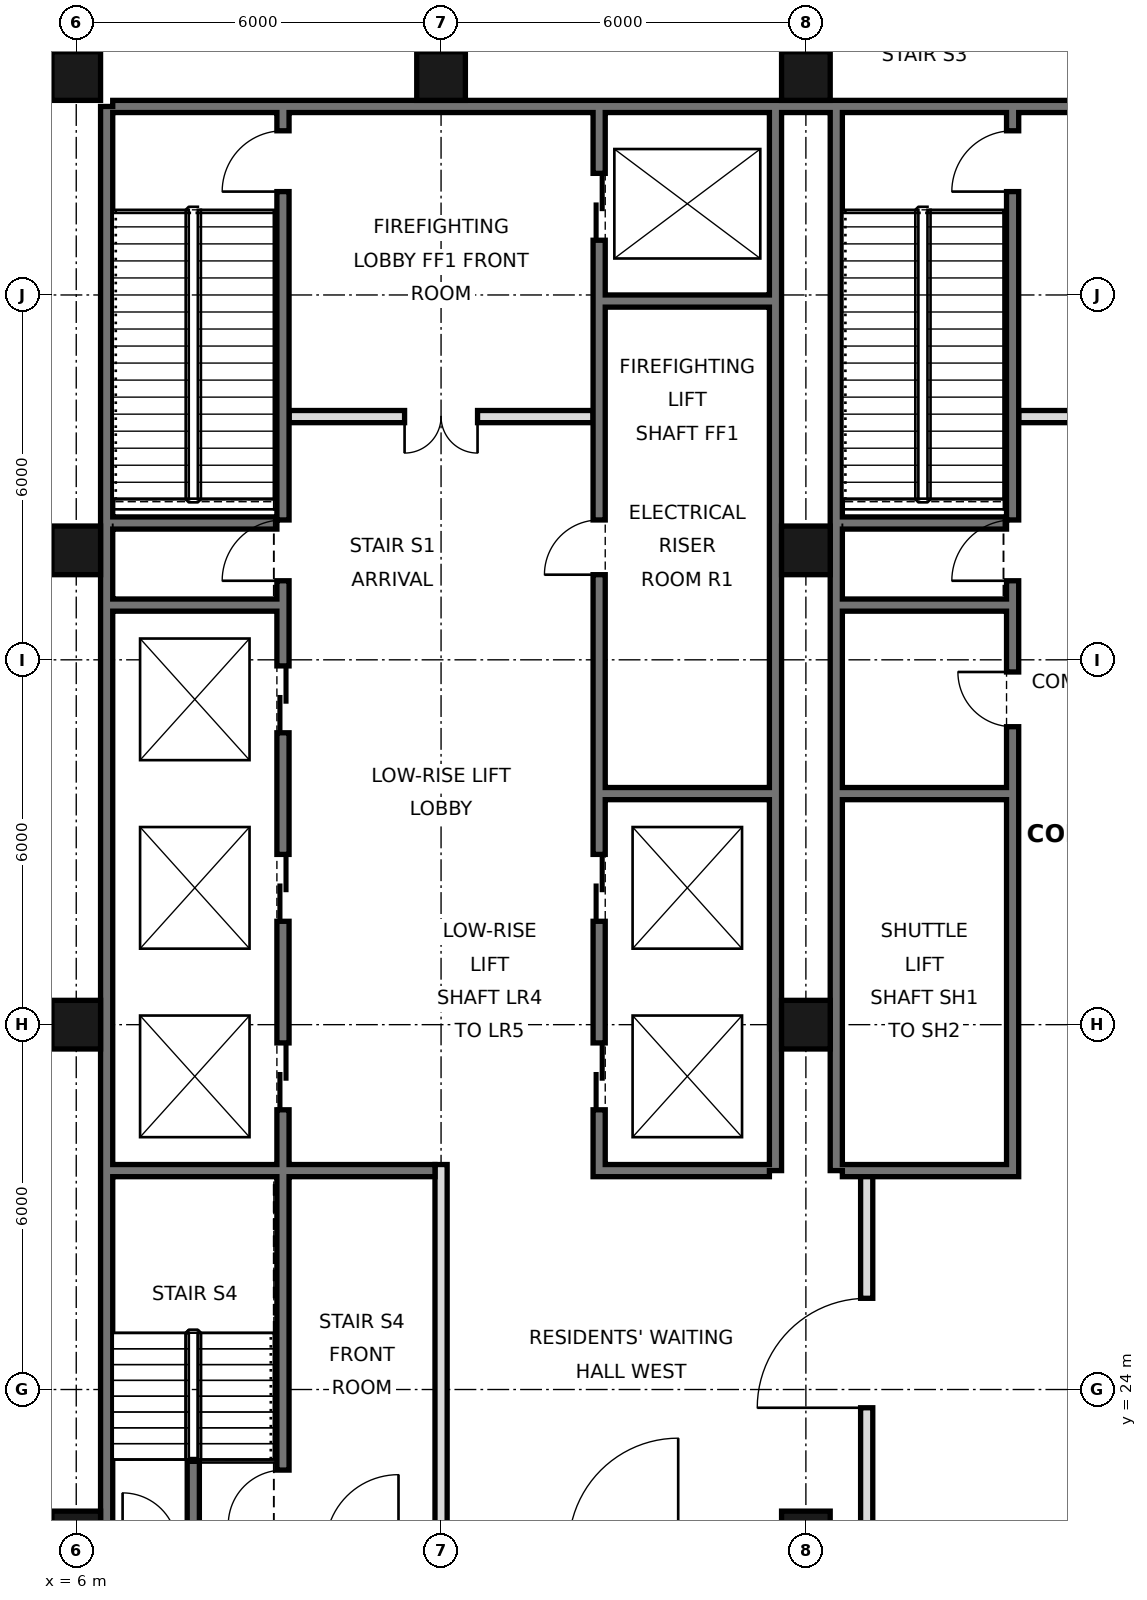
"""IFC4 building model, lengths in metres.
Left out: names, types, materials, properties, quantities, classifications, styles, units other than length and angle.
Written with IfcOpenShell. Run it as: python <this file> out.ifc"""

import sys

from ifc_helpers import new_model, si_unit, direction, frame, frame_2d, origin, origin_2d, place, context, subcontext, project, spatial, rectangle, hollow_rectangle, extrude, element, fill, save


model = new_model("IFC4")
c1 = context("Model", 3, precision=1e-05, world=origin(), true_north=direction((0.0, 1.0)))
c2 = subcontext(c1, "Body", "Model", "MODEL_VIEW")
j1 = project(units=[si_unit("LENGTHUNIT", "METRE"), si_unit("PLANEANGLEUNIT", "RADIAN")], contexts=[c1])
p1 = place(None, origin())
s1 = spatial("IfcSite", under=j1, at=p1, CompositionType="ELEMENT")
p2 = place(p1, origin())
s2 = spatial("IfcBuilding", under=s1, at=p2, CompositionType="ELEMENT")
p3 = place(p2, frame((0.0, 0.0, 90.2)))
s3 = spatial("IfcBuildingStorey", under=s2, at=p3, CompositionType="ELEMENT", Elevation=90.2)
for number, where, z_axis, x_axis in (
    (1, (6.0, 21.6, 0.0), (0.0, 0.0, 1.0), (1.0, 0.0, 0.0)),
    (2, (6.0, 30.0, 0.0), (0.0, 0.0, 1.0), (1.0, 0.0, 0.0)),
    (3, (6.0, 37.8, 0.0), (0.0, 0.0, 1.0), (1.0, 0.0, 0.0)),
    (4, (6.0, 45.6, 0.0), (0.0, 0.0, 1.0), (1.0, 0.0, 0.0)),
    (5, (12.0, 45.6, 0.0), (0.0, 0.0, 1.0), (1.0, 0.0, 0.0)),
    (6, (18.0, 21.6, 0.0), (0.0, 0.0, 1.0), (1.0, 0.0, 0.0)),
    (7, (18.0, 30.0, 0.0), (0.0, 0.0, 1.0), (1.0, 0.0, 0.0)),
    (8, (18.0, 37.8, 0.0), (0.0, 0.0, 1.0), (1.0, 0.0, 0.0)),
    (9, (18.0, 45.6, 0.0), (0.0, 0.0, 1.0), (1.0, 0.0, 0.0)),
):
    element("IfcColumn", number, at=place(p3, frame(where, z_axis=z_axis, x_axis=x_axis)), inside=s3, PredefinedType="COLUMN", context=c2, shape_type="SweptSolid", body=[
        extrude(hollow_rectangle(XDim=0.8, YDim=0.8, WallThickness=0.06, at=origin_2d()), origin(), (0.0, 0.0, 1.0), 6.0),
    ])
p4 = place(p3, frame((5.805, 48.47, 0.0), z_axis=(0.0, 0.0, 1.0), x_axis=(-0.707106781187, -0.707106781187, 0.0)))
e10 = element("IfcWall", 10, at=p4, inside=s3, PredefinedType="SOLIDWALL", context=c2, shape_type="SweptSolid", body=[
    extrude(rectangle(XDim=8.875, YDim=0.3, at=frame_2d((4.438, 0.0))), origin(), (0.0, 0.0, 1.0), 5.7),
])
p5 = place(p3, frame((6.5, 21.6, 0.0), z_axis=(0.0, 0.0, 1.0), x_axis=(0.0, 1.0, 0.0)))
e11 = element("IfcWall", 11, at=p5, inside=s3, PredefinedType="SOLIDWALL", context=c2, shape_type="SweptSolid", body=[
    extrude(rectangle(XDim=23.5, YDim=0.2, at=frame_2d((11.75, 0.0))), origin(), (0.0, 0.0, 1.0), 5.7),
])
p6 = place(p3, frame((6.6, 45.1, 0.0), z_axis=(0.0, 0.0, 1.0), x_axis=(1.0, 0.0, 0.0)))
e12 = element("IfcWall", 12, at=p6, inside=s3, PredefinedType="SOLIDWALL", context=c2, shape_type="SweptSolid", body=[
    extrude(rectangle(XDim=34.8, YDim=0.2, at=frame_2d((17.4, 0.0))), origin(), (0.0, 0.0, 1.0), 5.7),
])
for number, where, z_axis, x_axis in (
    (13, (17.5, 27.6, 0.0), (0.0, 0.0, 1.0), (0.0, 1.0, 0.0)),
    (14, (18.5, 27.6, 0.0), (0.0, 0.0, 1.0), (0.0, 1.0, 0.0)),
):
    element("IfcWall", number, at=place(p3, frame(where, z_axis=z_axis, x_axis=x_axis)), inside=s3, PredefinedType="SOLIDWALL", context=c2, shape_type="SweptSolid", body=[
        extrude(rectangle(XDim=17.5, YDim=0.2, at=frame_2d((8.75, 0.0))), origin(), (0.0, 0.0, 1.0), 5.7),
    ])
p7 = place(p3, frame((19.0, 21.6, 0.0), z_axis=(0.0, 0.0, 1.0), x_axis=(0.0, 1.0, 0.0)))
e15 = element("IfcWall", 15, at=p7, inside=s3, PredefinedType="PARTITIONING", context=c2, shape_type="SweptSolid", body=[
    extrude(rectangle(XDim=6.0, YDim=0.2, at=frame_2d((3.0, 0.0))), origin(), (0.0, 0.0, 1.0), 5.7),
])
p8 = place(p7, frame((2.1, 0.0, 0.0)))
e16 = element("IfcOpeningElement", 16, at=p8, cuts=e15, PredefinedType="OPENING", context=c2, shape_type="SweptSolid", body=[
    extrude(rectangle(XDim=1.8, YDim=2.1, at=frame_2d((0.9, 1.05))), frame((0.0, 0.11, 0.0), z_axis=(0.0, -1.0, 0.0), x_axis=(1.0, 0.0, 0.0)), (0.0, 0.0, 1.0), 0.22),
])
p9 = place(p3, frame((12.0, 21.6, 0.0), z_axis=(0.0, 0.0, 1.0), x_axis=(0.0, 1.0, 0.0)))
e17 = element("IfcWall", 17, at=p9, inside=s3, PredefinedType="PARTITIONING", context=c2, shape_type="SweptSolid", body=[
    extrude(rectangle(XDim=6.1, YDim=0.2, at=frame_2d((3.05, 0.0))), origin(), (0.0, 0.0, 1.0), 5.7),
])
p10 = place(p3, frame((14.6, 27.5, 0.0), z_axis=(0.0, 0.0, 1.0), x_axis=(0.0, 1.0, 0.0)))
e18 = element("IfcWall", 18, at=p10, inside=s3, PredefinedType="SOLIDWALL", context=c2, shape_type="SweptSolid", body=[
    extrude(rectangle(XDim=17.5, YDim=0.2, at=frame_2d((8.75, 0.0))), origin(), (0.0, 0.0, 1.0), 5.7),
])
p11 = place(p10, frame((1.1, 0.0, 0.0)))
e19 = element("IfcOpeningElement", 19, at=p11, cuts=e18, PredefinedType="OPENING", context=c2, shape_type="SweptSolid", body=[
    extrude(rectangle(XDim=1.1, YDim=2.1, at=frame_2d((0.55, 1.05))), frame((0.0, 0.11, 0.0), z_axis=(0.0, -1.0, 0.0), x_axis=(1.0, 0.0, 0.0)), (0.0, 0.0, 1.0), 0.22),
])
p12 = place(p10, frame((4.2, 0.0, 0.0)))
e20 = element("IfcOpeningElement", 20, at=p12, cuts=e18, PredefinedType="OPENING", context=c2, shape_type="SweptSolid", body=[
    extrude(rectangle(XDim=1.1, YDim=2.1, at=frame_2d((0.55, 1.05))), frame((0.0, 0.11, 0.0), z_axis=(0.0, -1.0, 0.0), x_axis=(1.0, 0.0, 0.0)), (0.0, 0.0, 1.0), 0.22),
])
p13 = place(p10, frame((15.4, 0.0, 0.0)))
e21 = element("IfcOpeningElement", 21, at=p13, cuts=e18, PredefinedType="OPENING", context=c2, shape_type="SweptSolid", body=[
    extrude(rectangle(XDim=1.1, YDim=2.1, at=frame_2d((0.55, 1.05))), frame((0.0, 0.11, 0.0), z_axis=(0.0, -1.0, 0.0), x_axis=(1.0, 0.0, 0.0)), (0.0, 0.0, 1.0), 0.22),
])
p14 = place(p10, frame((9.9, 0.0, 0.0)))
e22 = element("IfcOpeningElement", 22, at=p14, cuts=e18, PredefinedType="OPENING", context=c2, shape_type="SweptSolid", body=[
    extrude(rectangle(XDim=0.9, YDim=2.1, at=frame_2d((0.45, 1.05))), frame((0.0, 0.11, 0.0), z_axis=(0.0, -1.0, 0.0), x_axis=(1.0, 0.0, 0.0)), (0.0, 0.0, 1.0), 0.22),
])
p15 = place(p3, frame((21.4, 27.5, 0.0), z_axis=(0.0, 0.0, 1.0), x_axis=(0.0, 1.0, 0.0)))
e23 = element("IfcWall", 23, at=p15, inside=s3, PredefinedType="SOLIDWALL", context=c2, shape_type="SweptSolid", body=[
    extrude(rectangle(XDim=17.5, YDim=0.2, at=frame_2d((8.75, 0.0))), origin(), (0.0, 0.0, 1.0), 5.7),
])
p16 = place(p15, frame((9.8, 0.0, 0.0)))
e24 = element("IfcOpeningElement", 24, at=p16, cuts=e23, PredefinedType="OPENING", context=c2, shape_type="SweptSolid", body=[
    extrude(rectangle(XDim=1.0, YDim=2.1, at=frame_2d((0.5, 1.05))), frame((0.0, 0.11, 0.0), z_axis=(0.0, -1.0, 0.0), x_axis=(1.0, 0.0, 0.0)), (0.0, 0.0, 1.0), 0.22),
])
p17 = place(p15, frame((16.2, 0.0, 0.0)))
e25 = element("IfcOpeningElement", 25, at=p17, cuts=e23, PredefinedType="OPENING", context=c2, shape_type="SweptSolid", body=[
    extrude(rectangle(XDim=1.0, YDim=2.1, at=frame_2d((0.5, 1.05))), frame((0.0, 0.11, 0.0), z_axis=(0.0, -1.0, 0.0), x_axis=(1.0, 0.0, 0.0)), (0.0, 0.0, 1.0), 0.22),
])
p18 = place(p15, frame((7.4, 0.0, 0.0)))
e26 = element("IfcOpeningElement", 26, at=p18, cuts=e23, PredefinedType="OPENING", context=c2, shape_type="SweptSolid", body=[
    extrude(rectangle(XDim=0.9, YDim=2.1, at=frame_2d((0.45, 1.05))), frame((0.0, 0.11, 0.0), z_axis=(0.0, -1.0, 0.0), x_axis=(1.0, 0.0, 0.0)), (0.0, 0.0, 1.0), 0.22),
])
p19 = place(p3, frame((7.925, 21.6, 0.0), z_axis=(0.0, 0.0, 1.0), x_axis=(0.0, 1.0, 0.0)))
e27 = element("IfcWall", 27, at=p19, inside=s3, PredefinedType="SOLIDWALL", context=c2, shape_type="SweptSolid", body=[
    extrude(rectangle(XDim=1.25, YDim=0.2, at=frame_2d((0.625, 0.0))), origin(), (0.0, 0.0, 1.0), 5.7),
])
p20 = place(p3, frame((9.4, 21.6, 0.0), z_axis=(0.0, 0.0, 1.0), x_axis=(0.0, 1.0, 0.0)))
e28 = element("IfcWall", 28, at=p20, inside=s3, PredefinedType="SOLIDWALL", context=c2, shape_type="SweptSolid", body=[
    extrude(rectangle(XDim=23.4, YDim=0.2, at=frame_2d((11.7, 0.0))), origin(), (0.0, 0.0, 1.0), 5.7),
])
p21 = place(p20, frame((7.0, 0.0, 0.0)))
e29 = element("IfcOpeningElement", 29, at=p21, cuts=e28, PredefinedType="OPENING", context=c2, shape_type="SweptSolid", body=[
    extrude(rectangle(XDim=1.1, YDim=2.1, at=frame_2d((0.55, 1.05))), frame((0.0, 0.11, 0.0), z_axis=(0.0, -1.0, 0.0), x_axis=(1.0, 0.0, 0.0)), (0.0, 0.0, 1.0), 0.22),
])
p22 = place(p20, frame((10.1, 0.0, 0.0)))
e30 = element("IfcOpeningElement", 30, at=p22, cuts=e28, PredefinedType="OPENING", context=c2, shape_type="SweptSolid", body=[
    extrude(rectangle(XDim=1.1, YDim=2.1, at=frame_2d((0.55, 1.05))), frame((0.0, 0.11, 0.0), z_axis=(0.0, -1.0, 0.0), x_axis=(1.0, 0.0, 0.0)), (0.0, 0.0, 1.0), 0.22),
])
p23 = place(p20, frame((13.2, 0.0, 0.0)))
e31 = element("IfcOpeningElement", 31, at=p23, cuts=e28, PredefinedType="OPENING", context=c2, shape_type="SweptSolid", body=[
    extrude(rectangle(XDim=1.1, YDim=2.1, at=frame_2d((0.55, 1.05))), frame((0.0, 0.11, 0.0), z_axis=(0.0, -1.0, 0.0), x_axis=(1.0, 0.0, 0.0)), (0.0, 0.0, 1.0), 0.22),
])
p24 = place(p20, frame((15.7, 0.0, 0.0)))
e32 = element("IfcOpeningElement", 32, at=p24, cuts=e28, PredefinedType="OPENING", context=c2, shape_type="SweptSolid", body=[
    extrude(rectangle(XDim=1.0, YDim=2.1, at=frame_2d((0.5, 1.05))), frame((0.0, 0.11, 0.0), z_axis=(0.0, -1.0, 0.0), x_axis=(1.0, 0.0, 0.0)), (0.0, 0.0, 1.0), 0.22),
])
p25 = place(p20, frame((22.1, 0.0, 0.0)))
e33 = element("IfcOpeningElement", 33, at=p25, cuts=e28, PredefinedType="OPENING", context=c2, shape_type="SweptSolid", body=[
    extrude(rectangle(XDim=1.0, YDim=2.1, at=frame_2d((0.5, 1.05))), frame((0.0, 0.11, 0.0), z_axis=(0.0, -1.0, 0.0), x_axis=(1.0, 0.0, 0.0)), (0.0, 0.0, 1.0), 0.22),
])
p26 = place(p20, frame((0.175, 0.0, 0.0)))
e34 = element("IfcOpeningElement", 34, at=p26, cuts=e28, PredefinedType="OPENING", context=c2, shape_type="SweptSolid", body=[
    extrude(rectangle(XDim=0.9, YDim=2.1, at=frame_2d((0.45, 1.05))), frame((0.0, 0.11, 0.0), z_axis=(0.0, -1.0, 0.0), x_axis=(1.0, 0.0, 0.0)), (0.0, 0.0, 1.0), 0.22),
])
for number, where, z_axis, x_axis in (
    (35, (14.7, 27.6, 0.0), (0.0, 0.0, 1.0), (1.0, 0.0, 0.0)),
    (36, (18.6, 27.6, 0.0), (0.0, 0.0, 1.0), (1.0, 0.0, 0.0)),
):
    element("IfcWall", number, at=place(p3, frame(where, z_axis=z_axis, x_axis=x_axis)), inside=s3, PredefinedType="SOLIDWALL", context=c2, shape_type="SweptSolid", body=[
        extrude(rectangle(XDim=2.7, YDim=0.2, at=frame_2d((1.35, 0.0))), origin(), (0.0, 0.0, 1.0), 5.7),
    ])
p27 = place(p3, frame((6.6, 27.6, 0.0), z_axis=(0.0, 0.0, 1.0), x_axis=(1.0, 0.0, 0.0)))
e37 = element("IfcWall", 37, at=p27, inside=s3, PredefinedType="SOLIDWALL", context=c2, shape_type="SweptSolid", body=[
    extrude(rectangle(XDim=5.3, YDim=0.2, at=frame_2d((2.65, 0.0))), origin(), (0.0, 0.0, 1.0), 5.7),
])
for number, where, z_axis, x_axis in (
    (38, (14.7, 33.8, 0.0), (0.0, 0.0, 1.0), (1.0, 0.0, 0.0)),
    (39, (18.6, 33.8, 0.0), (0.0, 0.0, 1.0), (1.0, 0.0, 0.0)),
    (40, (18.6, 36.9, 0.0), (0.0, 0.0, 1.0), (1.0, 0.0, 0.0)),
    (41, (6.6, 36.9, 0.0), (0.0, 0.0, 1.0), (1.0, 0.0, 0.0)),
):
    element("IfcWall", number, at=place(p3, frame(where, z_axis=z_axis, x_axis=x_axis)), inside=s3, PredefinedType="SOLIDWALL", context=c2, shape_type="SweptSolid", body=[
        extrude(rectangle(XDim=2.7, YDim=0.2, at=frame_2d((1.35, 0.0))), origin(), (0.0, 0.0, 1.0), 5.7),
    ])
for number, where, z_axis, x_axis in (
    (42, (18.6, 38.25, 0.0), (0.0, 0.0, 1.0), (1.0, 0.0, 0.0)),
    (43, (6.6, 38.25, 0.0), (0.0, 0.0, 1.0), (1.0, 0.0, 0.0)),
):
    element("IfcWall", number, at=place(p3, frame(where, z_axis=z_axis, x_axis=x_axis)), inside=s3, PredefinedType="SOLIDWALL", context=c2, shape_type="SweptSolid", body=[
        extrude(rectangle(XDim=2.7, YDim=0.2, at=frame_2d((1.35, 0.0))), origin(), (0.0, 0.0, 1.0), 2.8),
    ])
p28 = place(p3, frame((21.5, 40.0, 0.0), z_axis=(0.0, 0.0, 1.0), x_axis=(1.0, 0.0, 0.0)))
e44 = element("IfcWall", 44, at=p28, inside=s3, PredefinedType="PARTITIONING", context=c2, shape_type="SweptSolid", body=[
    extrude(rectangle(XDim=5.0, YDim=0.2, at=frame_2d((2.5, 0.0))), origin(), (0.0, 0.0, 1.0), 5.7),
])
p29 = place(p28, frame((1.9, 0.0, 0.0)))
e45 = element("IfcOpeningElement", 45, at=p29, cuts=e44, PredefinedType="OPENING", context=c2, shape_type="SweptSolid", body=[
    extrude(rectangle(XDim=1.2, YDim=2.1, at=frame_2d((0.6, 1.05))), frame((0.0, 0.11, 0.0), z_axis=(0.0, -1.0, 0.0), x_axis=(1.0, 0.0, 0.0)), (0.0, 0.0, 1.0), 0.22),
])
p30 = place(p3, frame((9.5, 40.0, 0.0), z_axis=(0.0, 0.0, 1.0), x_axis=(1.0, 0.0, 0.0)))
e46 = element("IfcWall", 46, at=p30, inside=s3, PredefinedType="PARTITIONING", context=c2, shape_type="SweptSolid", body=[
    extrude(rectangle(XDim=5.0, YDim=0.2, at=frame_2d((2.5, 0.0))), origin(), (0.0, 0.0, 1.0), 5.7),
])
p31 = place(p30, frame((1.9, 0.0, 0.0)))
e47 = element("IfcOpeningElement", 47, at=p31, cuts=e46, PredefinedType="OPENING", context=c2, shape_type="SweptSolid", body=[
    extrude(rectangle(XDim=1.2, YDim=2.1, at=frame_2d((0.6, 1.05))), frame((0.0, 0.11, 0.0), z_axis=(0.0, -1.0, 0.0), x_axis=(1.0, 0.0, 0.0)), (0.0, 0.0, 1.0), 0.22),
])
p32 = place(p3, frame((14.7, 41.9, 0.0), z_axis=(0.0, 0.0, 1.0), x_axis=(1.0, 0.0, 0.0)))
e48 = element("IfcWall", 48, at=p32, inside=s3, PredefinedType="SOLIDWALL", context=c2, shape_type="SweptSolid", body=[
    extrude(rectangle(XDim=2.7, YDim=0.2, at=frame_2d((1.35, 0.0))), origin(), (0.0, 0.0, 1.0), 5.7),
])
p33 = place(p8, origin())
e49 = element("IfcDoor", 49, at=p33, inside=s3, OperationType="SINGLE_SWING_LEFT", PredefinedType="DOOR", context=c2, shape_type="SweptSolid", body=[
    extrude(rectangle(XDim=1.8, YDim=2.1, at=frame_2d((0.9, 1.05))), frame((0.0, 0.025, 0.0), z_axis=(0.0, -1.0, 0.0), x_axis=(1.0, 0.0, 0.0)), (0.0, 0.0, 1.0), 0.05),
])
fill(e16, e49)
p34 = place(p31, frame((1.2, 0.0, 0.0), z_axis=(0.0, 0.0, 1.0), x_axis=(-1.0, 0.0, 0.0)))
e50 = element("IfcDoor", 50, at=p34, inside=s3, OperationType="DOUBLE_DOOR_SINGLE_SWING", PredefinedType="DOOR", context=c2, shape_type="SweptSolid", body=[
    extrude(rectangle(XDim=1.2, YDim=2.1, at=frame_2d((0.6, 1.05))), frame((0.0, 0.025, 0.0), z_axis=(0.0, -1.0, 0.0), x_axis=(1.0, 0.0, 0.0)), (0.0, 0.0, 1.0), 0.05),
])
fill(e47, e50)
p35 = place(p11, origin())
e51 = element("IfcDoor", 51, at=p35, inside=s3, OperationType="DOUBLE_DOOR_SLIDING", PredefinedType="DOOR", context=c2, shape_type="SweptSolid", body=[
    extrude(rectangle(XDim=1.1, YDim=2.1, at=frame_2d((0.55, 1.05))), frame((0.0, 0.025, 0.0), z_axis=(0.0, -1.0, 0.0), x_axis=(1.0, 0.0, 0.0)), (0.0, 0.0, 1.0), 0.05),
])
fill(e19, e51)
p36 = place(p12, origin())
e52 = element("IfcDoor", 52, at=p36, inside=s3, OperationType="DOUBLE_DOOR_SLIDING", PredefinedType="DOOR", context=c2, shape_type="SweptSolid", body=[
    extrude(rectangle(XDim=1.1, YDim=2.1, at=frame_2d((0.55, 1.05))), frame((0.0, 0.025, 0.0), z_axis=(0.0, -1.0, 0.0), x_axis=(1.0, 0.0, 0.0)), (0.0, 0.0, 1.0), 0.05),
])
fill(e20, e52)
p37 = place(p13, origin())
e53 = element("IfcDoor", 53, at=p37, inside=s3, OperationType="DOUBLE_DOOR_SLIDING", PredefinedType="DOOR", context=c2, shape_type="SweptSolid", body=[
    extrude(rectangle(XDim=1.1, YDim=2.1, at=frame_2d((0.55, 1.05))), frame((0.0, 0.025, 0.0), z_axis=(0.0, -1.0, 0.0), x_axis=(1.0, 0.0, 0.0)), (0.0, 0.0, 1.0), 0.05),
])
fill(e21, e53)
p38 = place(p21, origin())
e54 = element("IfcDoor", 54, at=p38, inside=s3, OperationType="DOUBLE_DOOR_SLIDING", PredefinedType="DOOR", context=c2, shape_type="SweptSolid", body=[
    extrude(rectangle(XDim=1.1, YDim=2.1, at=frame_2d((0.55, 1.05))), frame((0.0, 0.025, 0.0), z_axis=(0.0, -1.0, 0.0), x_axis=(1.0, 0.0, 0.0)), (0.0, 0.0, 1.0), 0.05),
])
fill(e29, e54)
p39 = place(p22, origin())
e55 = element("IfcDoor", 55, at=p39, inside=s3, OperationType="DOUBLE_DOOR_SLIDING", PredefinedType="DOOR", context=c2, shape_type="SweptSolid", body=[
    extrude(rectangle(XDim=1.1, YDim=2.1, at=frame_2d((0.55, 1.05))), frame((0.0, 0.025, 0.0), z_axis=(0.0, -1.0, 0.0), x_axis=(1.0, 0.0, 0.0)), (0.0, 0.0, 1.0), 0.05),
])
fill(e30, e55)
p40 = place(p23, origin())
e56 = element("IfcDoor", 56, at=p40, inside=s3, OperationType="DOUBLE_DOOR_SLIDING", PredefinedType="DOOR", context=c2, shape_type="SweptSolid", body=[
    extrude(rectangle(XDim=1.1, YDim=2.1, at=frame_2d((0.55, 1.05))), frame((0.0, 0.025, 0.0), z_axis=(0.0, -1.0, 0.0), x_axis=(1.0, 0.0, 0.0)), (0.0, 0.0, 1.0), 0.05),
])
fill(e31, e56)
p41 = place(p24, origin())
e57 = element("IfcDoor", 57, at=p41, inside=s3, OperationType="SINGLE_SWING_LEFT", PredefinedType="DOOR", context=c2, shape_type="SweptSolid", body=[
    extrude(rectangle(XDim=1.0, YDim=2.1, at=frame_2d((0.5, 1.05))), frame((0.0, 0.025, 0.0), z_axis=(0.0, -1.0, 0.0), x_axis=(1.0, 0.0, 0.0)), (0.0, 0.0, 1.0), 0.05),
])
fill(e32, e57)
p42 = place(p25, origin())
e58 = element("IfcDoor", 58, at=p42, inside=s3, OperationType="SINGLE_SWING_LEFT", PredefinedType="DOOR", context=c2, shape_type="SweptSolid", body=[
    extrude(rectangle(XDim=1.0, YDim=2.1, at=frame_2d((0.5, 1.05))), frame((0.0, 0.025, 0.0), z_axis=(0.0, -1.0, 0.0), x_axis=(1.0, 0.0, 0.0)), (0.0, 0.0, 1.0), 0.05),
])
fill(e33, e58)
p43 = place(p16, origin())
e59 = element("IfcDoor", 59, at=p43, inside=s3, OperationType="SINGLE_SWING_LEFT", PredefinedType="DOOR", context=c2, shape_type="SweptSolid", body=[
    extrude(rectangle(XDim=1.0, YDim=2.1, at=frame_2d((0.5, 1.05))), frame((0.0, 0.025, 0.0), z_axis=(0.0, -1.0, 0.0), x_axis=(1.0, 0.0, 0.0)), (0.0, 0.0, 1.0), 0.05),
])
fill(e24, e59)
p44 = place(p17, origin())
e60 = element("IfcDoor", 60, at=p44, inside=s3, OperationType="SINGLE_SWING_LEFT", PredefinedType="DOOR", context=c2, shape_type="SweptSolid", body=[
    extrude(rectangle(XDim=1.0, YDim=2.1, at=frame_2d((0.5, 1.05))), frame((0.0, 0.025, 0.0), z_axis=(0.0, -1.0, 0.0), x_axis=(1.0, 0.0, 0.0)), (0.0, 0.0, 1.0), 0.05),
])
fill(e25, e60)
p45 = place(p26, origin())
e61 = element("IfcDoor", 61, at=p45, inside=s3, OperationType="SINGLE_SWING_LEFT", PredefinedType="DOOR", context=c2, shape_type="SweptSolid", body=[
    extrude(rectangle(XDim=0.9, YDim=2.1, at=frame_2d((0.45, 1.05))), frame((0.0, 0.025, 0.0), z_axis=(0.0, -1.0, 0.0), x_axis=(1.0, 0.0, 0.0)), (0.0, 0.0, 1.0), 0.05),
])
fill(e34, e61)
p46 = place(p14, origin())
e62 = element("IfcDoor", 62, at=p46, inside=s3, OperationType="SINGLE_SWING_LEFT", PredefinedType="DOOR", context=c2, shape_type="SweptSolid", body=[
    extrude(rectangle(XDim=0.9, YDim=2.1, at=frame_2d((0.45, 1.05))), frame((0.0, 0.025, 0.0), z_axis=(0.0, -1.0, 0.0), x_axis=(1.0, 0.0, 0.0)), (0.0, 0.0, 1.0), 0.05),
])
fill(e22, e62)
p47 = place(p18, frame((0.9, 0.0, 0.0), z_axis=(0.0, 0.0, 1.0), x_axis=(-1.0, 0.0, 0.0)))
e63 = element("IfcDoor", 63, at=p47, inside=s3, OperationType="SINGLE_SWING_LEFT", PredefinedType="DOOR", context=c2, shape_type="SweptSolid", body=[
    extrude(rectangle(XDim=0.9, YDim=2.1, at=frame_2d((0.45, 1.05))), frame((0.0, 0.025, 0.0), z_axis=(0.0, -1.0, 0.0), x_axis=(1.0, 0.0, 0.0)), (0.0, 0.0, 1.0), 0.05),
])
fill(e26, e63)
save(model, sys.argv[1])
